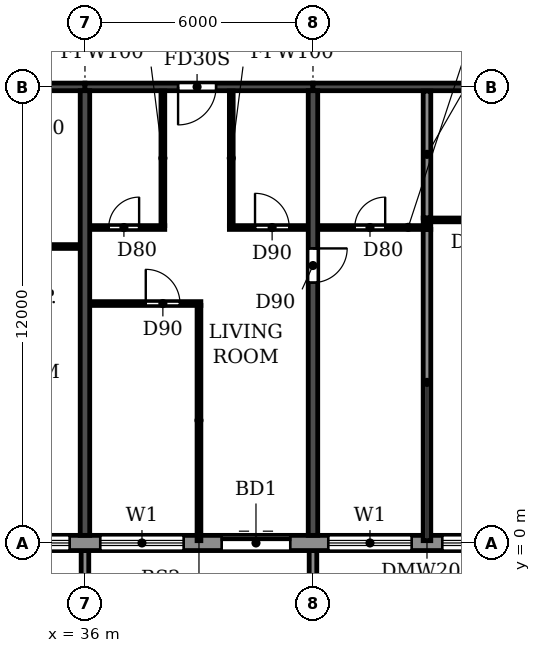
"""IFC4 building model, lengths in metres.
Left out: names, types, materials, properties, quantities, classifications, styles, units other than length and angle.
Written with IfcOpenShell. Run it as: python <this file> out.ifc"""

import sys

from ifc_helpers import new_model, si_unit, direction, frame, frame_2d, origin, place, context, subcontext, project, spatial, polyline, rectangle, outline, extrude, source, transform, mapped, element, fill, save


model = new_model("IFC4")
c1 = context("Model", 3, precision=1e-05, world=origin(), true_north=direction((0.0, 1.0)))
c2 = subcontext(c1, "Body", "Model", "MODEL_VIEW")
j1 = project(units=[si_unit("LENGTHUNIT", "METRE"), si_unit("PLANEANGLEUNIT", "RADIAN")], contexts=[c1])
p1 = place(None, origin())
s1 = spatial("IfcSite", under=j1, at=p1, CompositionType="ELEMENT")
p2 = place(p1, origin())
s2 = spatial("IfcBuilding", under=s1, at=p2, CompositionType="ELEMENT")
p3 = place(p2, frame((0.0, 0.0, 191.7)))
s3 = spatial("IfcBuildingStorey", under=s2, at=p3, CompositionType="ELEMENT", Elevation=191.7)
p4 = place(p3, frame((36.0, 0.2, 0.0), z_axis=(0.0, 0.0, 1.0), x_axis=(0.0, 1.0, 0.0)))
e1 = element("IfcWall", 1, at=p4, inside=s3, PredefinedType="SHEAR", context=c2, shape_type="SweptSolid", body=[
    extrude(rectangle(XDim=11.7, YDim=0.25, at=frame_2d((5.85, 0.0))), origin(), (0.0, 0.0, 1.0), 3.08),
])
p5 = place(p3, frame((42.0, 0.2, 0.0), z_axis=(0.0, 0.0, 1.0), x_axis=(0.0, 1.0, 0.0)))
e2 = element("IfcWall", 2, at=p5, inside=s3, PredefinedType="SHEAR", context=c2, shape_type="SweptSolid", body=[
    extrude(rectangle(XDim=11.7, YDim=0.25, at=frame_2d((5.85, 0.0))), origin(), (0.0, 0.0, 1.0), 3.08),
])
p6 = place(p5, frame((6.65, 0.0, 0.0)))
e3 = element("IfcOpeningElement", 3, at=p6, cuts=e2, PredefinedType="OPENING", context=c2, shape_type="SweptSolid", body=[
    extrude(rectangle(XDim=0.9, YDim=2.1, at=frame_2d((0.45, 1.05))), frame((0.0, 0.135, 0.0), z_axis=(0.0, -1.0, 0.0), x_axis=(1.0, 0.0, 0.0)), (0.0, 0.0, 1.0), 0.27),
])
p7 = place(p3, frame((30.0, 12.0, 0.0), z_axis=(0.0, 0.0, 1.0), x_axis=(1.0, 0.0, 0.0)))
e4 = element("IfcWall", 4, at=p7, inside=s3, PredefinedType="SHEAR", context=c2, shape_type="SweptSolid", body=[
    extrude(rectangle(XDim=6.0, YDim=0.2, at=frame_2d((3.0, 0.0))), origin(), (0.0, 0.0, 1.0), 2.48),
])
p8 = place(p7, frame((2.55, 0.0, 0.0)))
e5 = element("IfcOpeningElement", 5, at=p8, cuts=e4, PredefinedType="OPENING", context=c2, shape_type="SweptSolid", body=[
    extrude(rectangle(XDim=1.0, YDim=2.1, at=frame_2d((0.5, 1.05))), frame((0.0, 0.11, 0.0), z_axis=(0.0, -1.0, 0.0), x_axis=(1.0, 0.0, 0.0)), (0.0, 0.0, 1.0), 0.22),
])
p9 = place(p3, frame((36.0, 12.0, 0.0), z_axis=(0.0, 0.0, 1.0), x_axis=(1.0, 0.0, 0.0)))
e6 = element("IfcWall", 6, at=p9, inside=s3, PredefinedType="SHEAR", context=c2, shape_type="SweptSolid", body=[
    extrude(rectangle(XDim=6.0, YDim=0.2, at=frame_2d((3.0, 0.0))), origin(), (0.0, 0.0, 1.0), 2.48),
])
p10 = place(p9, frame((2.45, 0.0, 0.0)))
e7 = element("IfcOpeningElement", 7, at=p10, cuts=e6, PredefinedType="OPENING", context=c2, shape_type="SweptSolid", body=[
    extrude(rectangle(XDim=1.0, YDim=2.1, at=frame_2d((0.5, 1.05))), frame((0.0, 0.11, 0.0), z_axis=(0.0, -1.0, 0.0), x_axis=(1.0, 0.0, 0.0)), (0.0, 0.0, 1.0), 0.22),
])
p11 = place(p3, frame((42.0, 12.0, 0.0), z_axis=(0.0, 0.0, 1.0), x_axis=(1.0, 0.0, 0.0)))
e8 = element("IfcWall", 8, at=p11, inside=s3, PredefinedType="SHEAR", context=c2, shape_type="SweptSolid", body=[
    extrude(rectangle(XDim=6.0, YDim=0.2, at=frame_2d((3.0, 0.0))), origin(), (0.0, 0.0, 1.0), 2.48),
])
p12 = place(p3, frame((22.683, 0.0, 0.0), z_axis=(0.0, 0.0, 1.0), x_axis=(1.0, 0.0, 0.0)))
e9 = element("IfcWall", 9, at=p12, inside=s3, PredefinedType="STANDARD", context=c2, shape_type="SweptSolid", body=[
    extrude(rectangle(XDim=56.634, YDim=0.4, at=frame_2d((28.317, 0.0))), origin(), (0.0, 0.0, 1.0), 3.08),
])
p13 = place(p12, frame((1.717, 0.0, 0.9)))
e10 = element("IfcOpeningElement", 10, at=p13, cuts=e9, PredefinedType="OPENING", context=c2, shape_type="SweptSolid", body=[
    extrude(rectangle(XDim=2.2, YDim=1.5, at=frame_2d((1.1, 0.75))), frame((0.0, 0.21, 0.0), z_axis=(0.0, -1.0, 0.0), x_axis=(1.0, 0.0, 0.0)), (0.0, 0.0, 1.0), 0.42),
])
p14 = place(p12, frame((4.917, 0.0, 0.0)))
e11 = element("IfcOpeningElement", 11, at=p14, cuts=e9, PredefinedType="OPENING", context=c2, shape_type="SweptSolid", body=[
    extrude(rectangle(XDim=1.8, YDim=2.4, at=frame_2d((0.9, 1.2))), frame((0.0, 0.21, 0.0), z_axis=(0.0, -1.0, 0.0), x_axis=(1.0, 0.0, 0.0)), (0.0, 0.0, 1.0), 0.42),
])
p15 = place(p12, frame((7.717, 0.0, 0.9)))
e12 = element("IfcOpeningElement", 12, at=p15, cuts=e9, PredefinedType="OPENING", context=c2, shape_type="SweptSolid", body=[
    extrude(rectangle(XDim=2.2, YDim=1.5, at=frame_2d((1.1, 0.75))), frame((0.0, 0.21, 0.0), z_axis=(0.0, -1.0, 0.0), x_axis=(1.0, 0.0, 0.0)), (0.0, 0.0, 1.0), 0.42),
])
p16 = place(p12, frame((10.717, 0.0, 0.9)))
e13 = element("IfcOpeningElement", 13, at=p16, cuts=e9, PredefinedType="OPENING", context=c2, shape_type="SweptSolid", body=[
    extrude(rectangle(XDim=2.2, YDim=1.5, at=frame_2d((1.1, 0.75))), frame((0.0, 0.21, 0.0), z_axis=(0.0, -1.0, 0.0), x_axis=(1.0, 0.0, 0.0)), (0.0, 0.0, 1.0), 0.42),
])
p17 = place(p12, frame((13.717, 0.0, 0.9)))
e14 = element("IfcOpeningElement", 14, at=p17, cuts=e9, PredefinedType="OPENING", context=c2, shape_type="SweptSolid", body=[
    extrude(rectangle(XDim=2.2, YDim=1.5, at=frame_2d((1.1, 0.75))), frame((0.0, 0.21, 0.0), z_axis=(0.0, -1.0, 0.0), x_axis=(1.0, 0.0, 0.0)), (0.0, 0.0, 1.0), 0.42),
])
p18 = place(p12, frame((16.917, 0.0, 0.0)))
e15 = element("IfcOpeningElement", 15, at=p18, cuts=e9, PredefinedType="OPENING", context=c2, shape_type="SweptSolid", body=[
    extrude(rectangle(XDim=1.8, YDim=2.4, at=frame_2d((0.9, 1.2))), frame((0.0, 0.21, 0.0), z_axis=(0.0, -1.0, 0.0), x_axis=(1.0, 0.0, 0.0)), (0.0, 0.0, 1.0), 0.42),
])
p19 = place(p12, frame((19.717, 0.0, 0.9)))
e16 = element("IfcOpeningElement", 16, at=p19, cuts=e9, PredefinedType="OPENING", context=c2, shape_type="SweptSolid", body=[
    extrude(rectangle(XDim=2.2, YDim=1.5, at=frame_2d((1.1, 0.75))), frame((0.0, 0.21, 0.0), z_axis=(0.0, -1.0, 0.0), x_axis=(1.0, 0.0, 0.0)), (0.0, 0.0, 1.0), 0.42),
])
p20 = place(p12, frame((22.717, 0.0, 0.9)))
e17 = element("IfcOpeningElement", 17, at=p20, cuts=e9, PredefinedType="OPENING", context=c2, shape_type="SweptSolid", body=[
    extrude(rectangle(XDim=2.2, YDim=1.5, at=frame_2d((1.1, 0.75))), frame((0.0, 0.21, 0.0), z_axis=(0.0, -1.0, 0.0), x_axis=(1.0, 0.0, 0.0)), (0.0, 0.0, 1.0), 0.42),
])
p21 = place(p12, frame((25.917, 0.0, 0.0)))
e18 = element("IfcOpeningElement", 18, at=p21, cuts=e9, PredefinedType="OPENING", context=c2, shape_type="SweptSolid", body=[
    extrude(rectangle(XDim=1.8, YDim=2.4, at=frame_2d((0.9, 1.2))), frame((0.0, 0.21, 0.0), z_axis=(0.0, -1.0, 0.0), x_axis=(1.0, 0.0, 0.0)), (0.0, 0.0, 1.0), 0.42),
])
p22 = place(p12, frame((28.717, 0.0, 0.9)))
e19 = element("IfcOpeningElement", 19, at=p22, cuts=e9, PredefinedType="OPENING", context=c2, shape_type="SweptSolid", body=[
    extrude(rectangle(XDim=2.2, YDim=1.5, at=frame_2d((1.1, 0.75))), frame((0.0, 0.21, 0.0), z_axis=(0.0, -1.0, 0.0), x_axis=(1.0, 0.0, 0.0)), (0.0, 0.0, 1.0), 0.42),
])
p23 = place(p12, frame((31.717, 0.0, 0.9)))
e20 = element("IfcOpeningElement", 20, at=p23, cuts=e9, PredefinedType="OPENING", context=c2, shape_type="SweptSolid", body=[
    extrude(rectangle(XDim=2.2, YDim=1.5, at=frame_2d((1.1, 0.75))), frame((0.0, 0.21, 0.0), z_axis=(0.0, -1.0, 0.0), x_axis=(1.0, 0.0, 0.0)), (0.0, 0.0, 1.0), 0.42),
])
p24 = place(p12, frame((34.717, 0.0, 0.9)))
e21 = element("IfcOpeningElement", 21, at=p24, cuts=e9, PredefinedType="OPENING", context=c2, shape_type="SweptSolid", body=[
    extrude(rectangle(XDim=2.2, YDim=1.5, at=frame_2d((1.1, 0.75))), frame((0.0, 0.21, 0.0), z_axis=(0.0, -1.0, 0.0), x_axis=(1.0, 0.0, 0.0)), (0.0, 0.0, 1.0), 0.42),
])
p25 = place(p12, frame((37.717, 0.0, 0.9)))
e22 = element("IfcOpeningElement", 22, at=p25, cuts=e9, PredefinedType="OPENING", context=c2, shape_type="SweptSolid", body=[
    extrude(rectangle(XDim=2.2, YDim=1.5, at=frame_2d((1.1, 0.75))), frame((0.0, 0.21, 0.0), z_axis=(0.0, -1.0, 0.0), x_axis=(1.0, 0.0, 0.0)), (0.0, 0.0, 1.0), 0.42),
])
p26 = place(p12, frame((40.917, 0.0, 0.0)))
e23 = element("IfcOpeningElement", 23, at=p26, cuts=e9, PredefinedType="OPENING", context=c2, shape_type="SweptSolid", body=[
    extrude(rectangle(XDim=1.8, YDim=2.4, at=frame_2d((0.9, 1.2))), frame((0.0, 0.21, 0.0), z_axis=(0.0, -1.0, 0.0), x_axis=(1.0, 0.0, 0.0)), (0.0, 0.0, 1.0), 0.42),
])
p27 = place(p12, frame((43.717, 0.0, 0.9)))
e24 = element("IfcOpeningElement", 24, at=p27, cuts=e9, PredefinedType="OPENING", context=c2, shape_type="SweptSolid", body=[
    extrude(rectangle(XDim=2.2, YDim=1.5, at=frame_2d((1.1, 0.75))), frame((0.0, 0.21, 0.0), z_axis=(0.0, -1.0, 0.0), x_axis=(1.0, 0.0, 0.0)), (0.0, 0.0, 1.0), 0.42),
])
p28 = place(p12, frame((46.717, 0.0, 0.9)))
e25 = element("IfcOpeningElement", 25, at=p28, cuts=e9, PredefinedType="OPENING", context=c2, shape_type="SweptSolid", body=[
    extrude(rectangle(XDim=2.2, YDim=1.5, at=frame_2d((1.1, 0.75))), frame((0.0, 0.21, 0.0), z_axis=(0.0, -1.0, 0.0), x_axis=(1.0, 0.0, 0.0)), (0.0, 0.0, 1.0), 0.42),
])
p29 = place(p12, frame((49.917, 0.0, 0.0)))
e26 = element("IfcOpeningElement", 26, at=p29, cuts=e9, PredefinedType="OPENING", context=c2, shape_type="SweptSolid", body=[
    extrude(rectangle(XDim=1.8, YDim=2.4, at=frame_2d((0.9, 1.2))), frame((0.0, 0.21, 0.0), z_axis=(0.0, -1.0, 0.0), x_axis=(1.0, 0.0, 0.0)), (0.0, 0.0, 1.0), 0.42),
])
p30 = place(p12, frame((52.717, 0.0, 0.9)))
e27 = element("IfcOpeningElement", 27, at=p30, cuts=e9, PredefinedType="OPENING", context=c2, shape_type="SweptSolid", body=[
    extrude(rectangle(XDim=2.2, YDim=1.5, at=frame_2d((1.1, 0.75))), frame((0.0, 0.21, 0.0), z_axis=(0.0, -1.0, 0.0), x_axis=(1.0, 0.0, 0.0)), (0.0, 0.0, 1.0), 0.42),
])
m1 = source(origin(), c2, "Body", "SweptSolid", [
    extrude(outline(polyline([(0.0, 0.0), (0.2, 0.0), (0.2, 1.65), (0.0, 1.65), (0.0, 0.0)])), origin(), (0.0, 0.0, 1.0), 3.1),
])
for number, where in (
    (28, (35.9, -1.85, 0.0)),
    (29, (41.9, -1.85, 0.0)),
):
    element("IfcWall", number, at=place(p3, frame(where)), inside=s3, PredefinedType="STANDARD", context=c2, shape_type="MappedRepresentation", body=[
        mapped(m1, transform((0.0, 0.0, 0.0))),
    ])
p31 = place(p3, frame((45.0, 0.06, 0.0), z_axis=(0.0, 0.0, 1.0), x_axis=(0.0, 1.0, 0.0)))
e30 = element("IfcWall", 30, at=p31, inside=s3, PredefinedType="PARTITIONING", context=c2, shape_type="SweptSolid", body=[
    extrude(rectangle(XDim=8.19, YDim=0.2, at=frame_2d((4.095, 0.0))), origin(), (0.0, 0.0, 1.0), 3.08),
])
p32 = place(p3, frame((45.0, 8.55, 0.0), z_axis=(0.0, 0.0, 1.0), x_axis=(0.0, 1.0, 0.0)))
e31 = element("IfcWall", 31, at=p32, inside=s3, PredefinedType="PARTITIONING", context=c2, shape_type="SweptSolid", body=[
    extrude(rectangle(XDim=3.34, YDim=0.2, at=frame_2d((1.67, 0.0))), origin(), (0.0, 0.0, 1.0), 3.08),
])
p33 = place(p3, frame((36.135, 6.3, 0.0), z_axis=(0.0, 0.0, 1.0), x_axis=(1.0, 0.0, 0.0)))
e32 = element("IfcWall", 32, at=p33, inside=s3, PredefinedType="PARTITIONING", context=c2, shape_type="SweptSolid", body=[
    extrude(rectangle(XDim=2.915, YDim=0.1, at=frame_2d((1.458, 0.0))), origin(), (0.0, 0.0, 1.0), 3.08),
])
p34 = place(p33, frame((1.465, 0.0, 0.0)))
e33 = element("IfcOpeningElement", 33, at=p34, cuts=e32, PredefinedType="OPENING", context=c2, shape_type="SweptSolid", body=[
    extrude(rectangle(XDim=0.9, YDim=2.1, at=frame_2d((0.45, 1.05))), frame((0.0, 0.06, 0.0), z_axis=(0.0, -1.0, 0.0), x_axis=(1.0, 0.0, 0.0)), (0.0, 0.0, 1.0), 0.12),
])
p35 = place(p3, frame((33.9, 7.8, 0.0), z_axis=(0.0, 0.0, 1.0), x_axis=(1.0, 0.0, 0.0)))
e34 = element("IfcWall", 34, at=p35, inside=s3, PredefinedType="PARTITIONING", context=c2, shape_type="SweptSolid", body=[
    extrude(rectangle(XDim=1.965, YDim=0.1, at=frame_2d((0.982, 0.0))), origin(), (0.0, 0.0, 1.0), 3.08),
])
p36 = place(p3, frame((36.135, 8.3, 0.0), z_axis=(0.0, 0.0, 1.0), x_axis=(1.0, 0.0, 0.0)))
e35 = element("IfcWall", 35, at=p36, inside=s3, PredefinedType="PARTITIONING", context=c2, shape_type="SweptSolid", body=[
    extrude(rectangle(XDim=1.965, YDim=0.1, at=frame_2d((0.982, 0.0))), origin(), (0.0, 0.0, 1.0), 3.08),
])
p37 = place(p36, frame((0.49, 0.0, 0.0)))
e36 = element("IfcOpeningElement", 36, at=p37, cuts=e35, PredefinedType="OPENING", context=c2, shape_type="SweptSolid", body=[
    extrude(rectangle(XDim=0.8, YDim=2.1, at=frame_2d((0.4, 1.05))), frame((0.0, 0.06, 0.0), z_axis=(0.0, -1.0, 0.0), x_axis=(1.0, 0.0, 0.0)), (0.0, 0.0, 1.0), 0.12),
])
p38 = place(p3, frame((39.8, 8.3, 0.0), z_axis=(0.0, 0.0, 1.0), x_axis=(1.0, 0.0, 0.0)))
e37 = element("IfcWall", 37, at=p38, inside=s3, PredefinedType="PARTITIONING", context=c2, shape_type="SweptSolid", body=[
    extrude(rectangle(XDim=2.065, YDim=0.1, at=frame_2d((1.032, 0.0))), origin(), (0.0, 0.0, 1.0), 3.08),
])
p39 = place(p38, frame((0.675, 0.0, 0.0)))
e38 = element("IfcOpeningElement", 38, at=p39, cuts=e37, PredefinedType="OPENING", context=c2, shape_type="SweptSolid", body=[
    extrude(rectangle(XDim=0.9, YDim=2.1, at=frame_2d((0.45, 1.05))), frame((0.0, 0.06, 0.0), z_axis=(0.0, -1.0, 0.0), x_axis=(1.0, 0.0, 0.0)), (0.0, 0.0, 1.0), 0.12),
])
p40 = place(p3, frame((42.135, 8.3, 0.0), z_axis=(0.0, 0.0, 1.0), x_axis=(1.0, 0.0, 0.0)))
e39 = element("IfcWall", 39, at=p40, inside=s3, PredefinedType="PARTITIONING", context=c2, shape_type="SweptSolid", body=[
    extrude(rectangle(XDim=2.965, YDim=0.1, at=frame_2d((1.482, 0.0))), origin(), (0.0, 0.0, 1.0), 3.08),
])
p41 = place(p40, frame((0.965, 0.0, 0.0)))
e40 = element("IfcOpeningElement", 40, at=p41, cuts=e39, PredefinedType="OPENING", context=c2, shape_type="SweptSolid", body=[
    extrude(rectangle(XDim=0.8, YDim=2.1, at=frame_2d((0.4, 1.05))), frame((0.0, 0.06, 0.0), z_axis=(0.0, -1.0, 0.0), x_axis=(1.0, 0.0, 0.0)), (0.0, 0.0, 1.0), 0.12),
])
p42 = place(p3, frame((44.9, 8.5, 0.0), z_axis=(0.0, 0.0, 1.0), x_axis=(1.0, 0.0, 0.0)))
e41 = element("IfcWall", 41, at=p42, inside=s3, PredefinedType="PARTITIONING", context=c2, shape_type="SweptSolid", body=[
    extrude(rectangle(XDim=2.965, YDim=0.1, at=frame_2d((1.482, 0.0))), origin(), (0.0, 0.0, 1.0), 3.08),
])
p43 = place(p42, frame((1.2, 0.0, 0.0)))
e42 = element("IfcOpeningElement", 42, at=p43, cuts=e41, PredefinedType="OPENING", context=c2, shape_type="SweptSolid", body=[
    extrude(rectangle(XDim=0.8, YDim=2.1, at=frame_2d((0.4, 1.05))), frame((0.0, 0.06, 0.0), z_axis=(0.0, -1.0, 0.0), x_axis=(1.0, 0.0, 0.0)), (0.0, 0.0, 1.0), 0.12),
])
p44 = place(p3, frame((38.05, 8.35, 0.0), z_axis=(0.0, 0.0, 1.0), x_axis=(0.0, 1.0, 0.0)))
e43 = element("IfcWall", 43, at=p44, inside=s3, PredefinedType="PARTITIONING", context=c2, shape_type="SweptSolid", body=[
    extrude(rectangle(XDim=3.54, YDim=0.1, at=frame_2d((1.77, 0.0))), origin(), (0.0, 0.0, 1.0), 3.08),
])
p45 = place(p3, frame((39.0, 0.06, 0.0), z_axis=(0.0, 0.0, 1.0), x_axis=(0.0, 1.0, 0.0)))
e44 = element("IfcWall", 44, at=p45, inside=s3, PredefinedType="PARTITIONING", context=c2, shape_type="SweptSolid", body=[
    extrude(rectangle(XDim=6.19, YDim=0.1, at=frame_2d((3.095, 0.0))), origin(), (0.0, 0.0, 1.0), 3.08),
])
p46 = place(p3, frame((39.85, 8.35, 0.0), z_axis=(0.0, 0.0, 1.0), x_axis=(0.0, 1.0, 0.0)))
e45 = element("IfcWall", 45, at=p46, inside=s3, PredefinedType="PARTITIONING", context=c2, shape_type="SweptSolid", body=[
    extrude(rectangle(XDim=3.54, YDim=0.1, at=frame_2d((1.77, 0.0))), origin(), (0.0, 0.0, 1.0), 3.08),
])
p47 = place(p16, origin())
e46 = element("IfcWindow", 46, at=p47, inside=s3, PartitioningType="DOUBLE_PANEL_HORIZONTAL", PredefinedType="WINDOW", context=c2, shape_type="SweptSolid", body=[
    extrude(rectangle(XDim=2.2, YDim=1.5, at=frame_2d((1.1, 0.75))), frame((0.0, 0.03, 0.0), z_axis=(0.0, -1.0, 0.0), x_axis=(1.0, 0.0, 0.0)), (0.0, 0.0, 1.0), 0.06),
])
fill(e13, e46)
p48 = place(p17, origin())
e47 = element("IfcWindow", 47, at=p48, inside=s3, PartitioningType="DOUBLE_PANEL_HORIZONTAL", PredefinedType="WINDOW", context=c2, shape_type="SweptSolid", body=[
    extrude(rectangle(XDim=2.2, YDim=1.5, at=frame_2d((1.1, 0.75))), frame((0.0, 0.03, 0.0), z_axis=(0.0, -1.0, 0.0), x_axis=(1.0, 0.0, 0.0)), (0.0, 0.0, 1.0), 0.06),
])
fill(e14, e47)
p49 = place(p18, origin())
e48 = element("IfcDoor", 48, at=p49, inside=s3, OperationType="DOUBLE_DOOR_SLIDING", PredefinedType="DOOR", context=c2, shape_type="SweptSolid", body=[
    extrude(rectangle(XDim=1.8, YDim=2.4, at=frame_2d((0.9, 1.2))), frame((0.0, 0.025, 0.0), z_axis=(0.0, -1.0, 0.0), x_axis=(1.0, 0.0, 0.0)), (0.0, 0.0, 1.0), 0.05),
])
fill(e15, e48)
p50 = place(p19, origin())
e49 = element("IfcWindow", 49, at=p50, inside=s3, PartitioningType="DOUBLE_PANEL_HORIZONTAL", PredefinedType="WINDOW", context=c2, shape_type="SweptSolid", body=[
    extrude(rectangle(XDim=2.2, YDim=1.5, at=frame_2d((1.1, 0.75))), frame((0.0, 0.03, 0.0), z_axis=(0.0, -1.0, 0.0), x_axis=(1.0, 0.0, 0.0)), (0.0, 0.0, 1.0), 0.06),
])
fill(e16, e49)
p51 = place(p20, origin())
e50 = element("IfcWindow", 50, at=p51, inside=s3, PartitioningType="DOUBLE_PANEL_HORIZONTAL", PredefinedType="WINDOW", context=c2, shape_type="SweptSolid", body=[
    extrude(rectangle(XDim=2.2, YDim=1.5, at=frame_2d((1.1, 0.75))), frame((0.0, 0.03, 0.0), z_axis=(0.0, -1.0, 0.0), x_axis=(1.0, 0.0, 0.0)), (0.0, 0.0, 1.0), 0.06),
])
fill(e17, e50)
p52 = place(p41, origin())
e51 = element("IfcDoor", 51, at=p52, inside=s3, OperationType="SINGLE_SWING_RIGHT", PredefinedType="DOOR", context=c2, shape_type="SweptSolid", body=[
    extrude(rectangle(XDim=0.8, YDim=2.1, at=frame_2d((0.4, 1.05))), frame((0.0, 0.025, 0.0), z_axis=(0.0, -1.0, 0.0), x_axis=(1.0, 0.0, 0.0)), (0.0, 0.0, 1.0), 0.05),
])
fill(e40, e51)
p53 = place(p37, origin())
e52 = element("IfcDoor", 52, at=p53, inside=s3, OperationType="SINGLE_SWING_RIGHT", PredefinedType="DOOR", context=c2, shape_type="SweptSolid", body=[
    extrude(rectangle(XDim=0.8, YDim=2.1, at=frame_2d((0.4, 1.05))), frame((0.0, 0.025, 0.0), z_axis=(0.0, -1.0, 0.0), x_axis=(1.0, 0.0, 0.0)), (0.0, 0.0, 1.0), 0.05),
])
fill(e36, e52)
p54 = place(p34, origin())
e53 = element("IfcDoor", 53, at=p54, inside=s3, OperationType="SINGLE_SWING_LEFT", PredefinedType="DOOR", context=c2, shape_type="SweptSolid", body=[
    extrude(rectangle(XDim=0.9, YDim=2.1, at=frame_2d((0.45, 1.05))), frame((0.0, 0.025, 0.0), z_axis=(0.0, -1.0, 0.0), x_axis=(1.0, 0.0, 0.0)), (0.0, 0.0, 1.0), 0.05),
])
fill(e33, e53)
p55 = place(p10, frame((1.0, 0.0, 0.0), z_axis=(0.0, 0.0, 1.0), x_axis=(-1.0, 0.0, 0.0)))
e54 = element("IfcDoor", 54, at=p55, inside=s3, OperationType="SINGLE_SWING_RIGHT", PredefinedType="DOOR", context=c2, shape_type="SweptSolid", body=[
    extrude(rectangle(XDim=1.0, YDim=2.1, at=frame_2d((0.5, 1.05))), frame((0.0, 0.025, 0.0), z_axis=(0.0, -1.0, 0.0), x_axis=(1.0, 0.0, 0.0)), (0.0, 0.0, 1.0), 0.05),
])
fill(e7, e54)
p56 = place(p39, origin())
e55 = element("IfcDoor", 55, at=p56, inside=s3, OperationType="SINGLE_SWING_LEFT", PredefinedType="DOOR", context=c2, shape_type="SweptSolid", body=[
    extrude(rectangle(XDim=0.9, YDim=2.1, at=frame_2d((0.45, 1.05))), frame((0.0, 0.025, 0.0), z_axis=(0.0, -1.0, 0.0), x_axis=(1.0, 0.0, 0.0)), (0.0, 0.0, 1.0), 0.05),
])
fill(e38, e55)
p57 = place(p6, frame((0.9, 0.0, 0.0), z_axis=(0.0, 0.0, 1.0), x_axis=(-1.0, 0.0, 0.0)))
e56 = element("IfcDoor", 56, at=p57, inside=s3, OperationType="SINGLE_SWING_LEFT", PredefinedType="DOOR", context=c2, shape_type="SweptSolid", body=[
    extrude(rectangle(XDim=0.9, YDim=2.1, at=frame_2d((0.45, 1.05))), frame((0.0, 0.025, 0.0), z_axis=(0.0, -1.0, 0.0), x_axis=(1.0, 0.0, 0.0)), (0.0, 0.0, 1.0), 0.05),
])
fill(e3, e56)
save(model, sys.argv[1])
